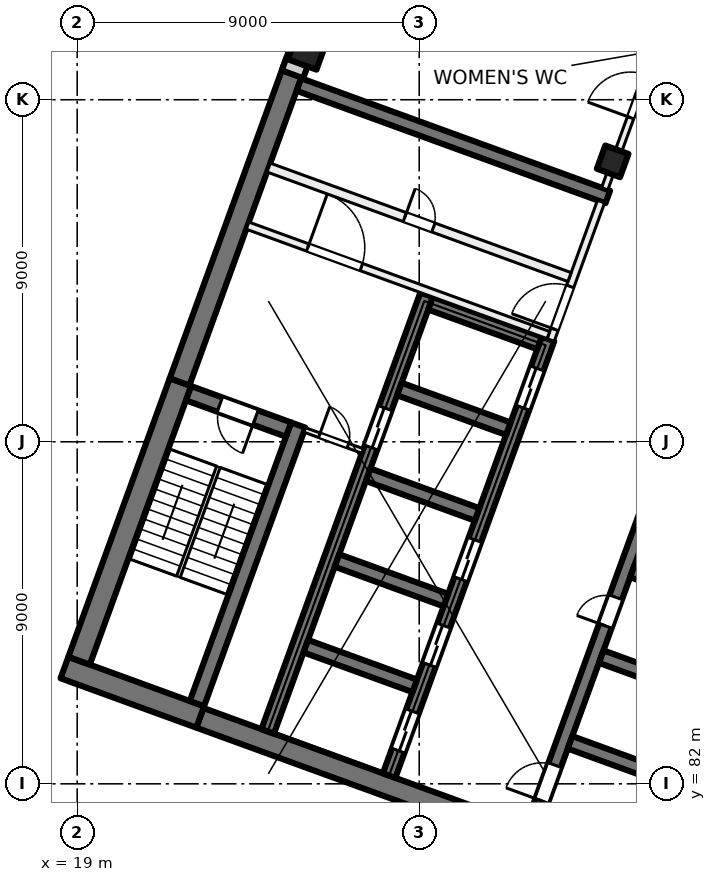
"""IFC4 building model, lengths in metres.
Left out: names, types, materials, properties, quantities, classifications, styles, units other than length and angle.
Written with IfcOpenShell. Run it as: python <this file> out.ifc"""

import sys

from ifc_helpers import new_model, si_unit, direction, frame, frame_2d, origin, origin_2d, place, context, subcontext, project, spatial, rectangle, extrude, element, fill, save


model = new_model("IFC4")
c1 = context("Model", 3, precision=1e-05, world=origin(), true_north=direction((0.0, 1.0)))
c2 = subcontext(c1, "Body", "Model", "MODEL_VIEW")
j1 = project(units=[si_unit("LENGTHUNIT", "METRE"), si_unit("PLANEANGLEUNIT", "RADIAN")], contexts=[c1])
p1 = place(None, origin())
s1 = spatial("IfcSite", under=j1, at=p1, CompositionType="ELEMENT")
p2 = place(p1, origin())
s2 = spatial("IfcBuilding", under=s1, at=p2, CompositionType="ELEMENT")
p3 = place(p2, frame((0.0, 0.0, 178.5)))
s3 = spatial("IfcBuildingStorey", under=s2, at=p3, CompositionType="ELEMENT", Elevation=178.5)
p4 = place(p3, frame((33.091, 98.379, 0.0), z_axis=(0.0, 0.0, 1.0), x_axis=(-0.342020143326, -0.939692620786, 0.0)))
e1 = element("IfcColumn", 1, at=p4, inside=s3, PredefinedType="COLUMN", context=c2, shape_type="SweptSolid", body=[
    extrude(rectangle(XDim=0.65, YDim=0.65, at=origin_2d()), origin(), (0.0, 0.0, 1.0), 4.0),
])
p5 = place(p3, frame((25.056, 101.303, 0.0), z_axis=(0.0, 0.0, 1.0), x_axis=(-0.342020143326, -0.939692620786, 0.0)))
e2 = element("IfcColumn", 2, at=p5, inside=s3, PredefinedType="COLUMN", context=c2, shape_type="SweptSolid", body=[
    extrude(rectangle(XDim=0.8, YDim=0.8, at=origin_2d()), origin(), (0.0, 0.0, 1.0), 4.0),
])
p6 = place(p3, frame((35.759, 78.811, 0.0), z_axis=(0.0, 0.0, 1.0), x_axis=(-0.939692894512, 0.342019391267, 0.0)))
e3 = element("IfcWall", 3, at=p6, inside=s3, PredefinedType="SHEAR", context=c2, shape_type="SweptSolid", body=[
    extrude(rectangle(XDim=14.4, YDim=0.55, at=frame_2d((7.2, 0.0))), origin(), (0.0, 0.0, 1.0), 4.0),
])
p7 = place(p3, frame((22.236, 83.76, 0.0), z_axis=(0.0, 0.0, 1.0), x_axis=(-0.939680822529, 0.342052557032, 0.0)))
e4 = element("IfcWall", 4, at=p7, inside=s3, PredefinedType="SHEAR", context=c2, shape_type="SweptSolid", body=[
    extrude(rectangle(XDim=3.8, YDim=0.6, at=frame_2d((1.9, 0.0))), origin(), (0.0, 0.0, 1.0), 4.0),
])
p8 = place(p3, frame((19.05, 85.239, 0.0), z_axis=(0.0, 0.0, 1.0), x_axis=(0.342016982193, 0.939693771338, 0.0)))
e5 = element("IfcWall", 5, at=p8, inside=s3, PredefinedType="SHEAR", context=c2, shape_type="SweptSolid", body=[
    extrude(rectangle(XDim=7.8, YDim=0.6, at=frame_2d((3.9, 0.0))), origin(), (0.0, 0.0, 1.0), 4.0),
])
p9 = place(p3, frame((21.694, 92.577, 0.0), z_axis=(0.0, 0.0, 1.0), x_axis=(0.342010253184, 0.939696220444, 0.0)))
e6 = element("IfcWall", 6, at=p9, inside=s3, PredefinedType="SHEAR", context=c2, shape_type="SweptSolid", body=[
    extrude(rectangle(XDim=8.95, YDim=0.55, at=frame_2d((4.475, 0.0))), origin(), (0.0, 0.0, 1.0), 4.0),
])
p10 = place(p3, frame((22.15, 84.11, 0.0), z_axis=(0.0, 0.0, 1.0), x_axis=(0.342016982193, 0.939693771338, 0.0)))
e7 = element("IfcWall", 7, at=p10, inside=s3, PredefinedType="SHEAR", context=c2, shape_type="SweptSolid", body=[
    extrude(rectangle(XDim=7.8, YDim=0.4, at=frame_2d((3.9, 0.0))), origin(), (0.0, 0.0, 1.0), 4.0),
])
p11 = place(p3, frame((24.562, 91.32, 0.0), z_axis=(0.0, 0.0, 1.0), x_axis=(-0.939717030584, 0.341953070509, 0.0)))
e8 = element("IfcWall", 8, at=p11, inside=s3, PredefinedType="SHEAR", context=c2, shape_type="SweptSolid", body=[
    extrude(rectangle(XDim=2.8, YDim=0.4, at=frame_2d((1.4, 0.0))), origin(), (0.0, 0.0, 1.0), 4.0),
])
p12 = place(p11, frame((0.925, 0.0, 0.0)))
e9 = element("IfcOpeningElement", 9, at=p12, cuts=e8, PredefinedType="OPENING", context=c2, shape_type="SweptSolid", body=[
    extrude(rectangle(XDim=1.0, YDim=2.1, at=frame_2d((0.5, 1.05))), frame((0.0, 0.21, 0.0), z_axis=(0.0, -1.0, 0.0), x_axis=(1.0, 0.0, 0.0)), (0.0, 0.0, 1.0), 0.42),
])
p13 = place(p3, frame((30.967, 80.848, 0.0), z_axis=(0.0, 0.0, 1.0), x_axis=(0.34201563943, 0.939694260058, 0.0)))
e10 = element("IfcWall", 10, at=p13, inside=s3, PredefinedType="SHEAR", context=c2, shape_type="SweptSolid", body=[
    extrude(rectangle(XDim=12.225, YDim=0.35, at=frame_2d((6.113, 0.0))), origin(), (0.0, 0.0, 1.0), 4.0),
])
p14 = place(p13, frame((0.75, 0.0, 0.0)))
e11 = element("IfcOpeningElement", 11, at=p14, cuts=e10, PredefinedType="OPENING", context=c2, shape_type="SweptSolid", body=[
    extrude(rectangle(XDim=1.0, YDim=2.1, at=frame_2d((0.5, 1.05))), frame((0.0, 0.185, 0.0), z_axis=(0.0, -1.0, 0.0), x_axis=(1.0, 0.0, 0.0)), (0.0, 0.0, 1.0), 0.37),
])
p15 = place(p13, frame((5.65, 0.0, 0.0)))
e12 = element("IfcOpeningElement", 12, at=p15, cuts=e10, PredefinedType="OPENING", context=c2, shape_type="SweptSolid", body=[
    extrude(rectangle(XDim=0.8, YDim=2.1, at=frame_2d((0.4, 1.05))), frame((0.0, 0.185, 0.0), z_axis=(0.0, -1.0, 0.0), x_axis=(1.0, 0.0, 0.0)), (0.0, 0.0, 1.0), 0.37),
])
p16 = place(p3, frame((34.835, 82.047, 0.0), z_axis=(0.0, 0.0, 1.0), x_axis=(-0.939683528043, 0.3420451244, 0.0)))
e13 = element("IfcWall", 13, at=p16, inside=s3, PredefinedType="SHEAR", context=c2, shape_type="SweptSolid", body=[
    extrude(rectangle(XDim=3.05, YDim=0.35, at=frame_2d((1.525, 0.0))), origin(), (0.0, 0.0, 1.0), 4.0),
])
p17 = place(p3, frame((35.656, 84.303, 0.0), z_axis=(0.0, 0.0, 1.0), x_axis=(-0.939709254651, 0.341974438698, 0.0)))
e14 = element("IfcWall", 14, at=p17, inside=s3, PredefinedType="SHEAR", context=c2, shape_type="SweptSolid", body=[
    extrude(rectangle(XDim=3.05, YDim=0.35, at=frame_2d((1.525, 0.0))), origin(), (0.0, 0.0, 1.0), 4.0),
])
p18 = place(p3, frame((36.477, 86.558, 0.0), z_axis=(0.0, 0.0, 1.0), x_axis=(-0.939683528043, 0.3420451244, 0.0)))
e15 = element("IfcWall", 15, at=p18, inside=s3, PredefinedType="SHEAR", context=c2, shape_type="SweptSolid", body=[
    extrude(rectangle(XDim=3.05, YDim=0.35, at=frame_2d((1.525, 0.0))), origin(), (0.0, 0.0, 1.0), 4.0),
])
p19 = place(p3, frame((27.208, 82.216, 0.0), z_axis=(0.0, 0.0, 1.0), x_axis=(0.34201563943, 0.939694260058, 0.0)))
e16 = element("IfcWall", 16, at=p19, inside=s3, PredefinedType="SHEAR", context=c2, shape_type="SweptSolid", body=[
    extrude(rectangle(XDim=12.225, YDim=0.35, at=frame_2d((6.113, 0.0))), origin(), (0.0, 0.0, 1.0), 4.0),
])
p20 = place(p19, frame((0.7, 0.0, 0.0)))
e17 = element("IfcOpeningElement", 17, at=p20, cuts=e16, PredefinedType="OPENING", context=c2, shape_type="SweptSolid", body=[
    extrude(rectangle(XDim=1.1, YDim=2.1, at=frame_2d((0.55, 1.05))), frame((0.0, 0.185, 0.0), z_axis=(0.0, -1.0, 0.0), x_axis=(1.0, 0.0, 0.0)), (0.0, 0.0, 1.0), 0.37),
])
p21 = place(p19, frame((3.1, 0.0, 0.0)))
e18 = element("IfcOpeningElement", 18, at=p21, cuts=e16, PredefinedType="OPENING", context=c2, shape_type="SweptSolid", body=[
    extrude(rectangle(XDim=1.1, YDim=2.1, at=frame_2d((0.55, 1.05))), frame((0.0, 0.185, 0.0), z_axis=(0.0, -1.0, 0.0), x_axis=(1.0, 0.0, 0.0)), (0.0, 0.0, 1.0), 0.37),
])
p22 = place(p19, frame((5.5, 0.0, 0.0)))
e19 = element("IfcOpeningElement", 19, at=p22, cuts=e16, PredefinedType="OPENING", context=c2, shape_type="SweptSolid", body=[
    extrude(rectangle(XDim=1.1, YDim=2.1, at=frame_2d((0.55, 1.05))), frame((0.0, 0.185, 0.0), z_axis=(0.0, -1.0, 0.0), x_axis=(1.0, 0.0, 0.0)), (0.0, 0.0, 1.0), 0.37),
])
p23 = place(p19, frame((10.3, 0.0, 0.0)))
e20 = element("IfcOpeningElement", 20, at=p23, cuts=e16, PredefinedType="OPENING", context=c2, shape_type="SweptSolid", body=[
    extrude(rectangle(XDim=1.1, YDim=2.1, at=frame_2d((0.55, 1.05))), frame((0.0, 0.185, 0.0), z_axis=(0.0, -1.0, 0.0), x_axis=(1.0, 0.0, 0.0)), (0.0, 0.0, 1.0), 0.37),
])
p24 = place(p3, frame((24.013, 83.379, 0.0), z_axis=(0.0, 0.0, 1.0), x_axis=(0.34201563943, 0.939694260058, 0.0)))
e21 = element("IfcWall", 21, at=p24, inside=s3, PredefinedType="SHEAR", context=c2, shape_type="SweptSolid", body=[
    extrude(rectangle(XDim=12.225, YDim=0.35, at=frame_2d((6.113, 0.0))), origin(), (0.0, 0.0, 1.0), 4.0),
])
p25 = place(p24, frame((7.95, 0.0, 0.0)))
e22 = element("IfcOpeningElement", 22, at=p25, cuts=e21, PredefinedType="OPENING", context=c2, shape_type="SweptSolid", body=[
    extrude(rectangle(XDim=1.1, YDim=2.1, at=frame_2d((0.55, 1.05))), frame((0.0, 0.185, 0.0), z_axis=(0.0, -1.0, 0.0), x_axis=(1.0, 0.0, 0.0)), (0.0, 0.0, 1.0), 0.37),
])
for number, where, z_axis, x_axis in (
    (23, (27.881, 84.578, 0.0), (0.0, 0.0, 1.0), (-0.94, 0.342, 0.0)),
    (24, (28.702, 86.833, 0.0), (0.0, 0.0, 1.0), (-0.94, 0.342, 0.0)),
    (25, (29.523, 89.089, 0.0), (0.0, 0.0, 1.0), (-0.94, 0.342, 0.0)),
):
    element("IfcWall", number, at=place(p3, frame(where, z_axis=z_axis, x_axis=x_axis)), inside=s3, PredefinedType="SHEAR", context=c2, shape_type="SweptSolid", body=[
        extrude(rectangle(XDim=3.05, YDim=0.35, at=frame_2d((1.525, 0.0))), origin(), (0.0, 0.0, 1.0), 4.0),
    ])
p26 = place(p3, frame((30.344, 91.344, 0.0), z_axis=(0.0, 0.0, 1.0), x_axis=(-0.939709254651, 0.341974438698, 0.0)))
e26 = element("IfcWall", 26, at=p26, inside=s3, PredefinedType="SHEAR", context=c2, shape_type="SweptSolid", body=[
    extrude(rectangle(XDim=3.05, YDim=0.35, at=frame_2d((1.525, 0.0))), origin(), (0.0, 0.0, 1.0), 4.0),
])
p27 = place(p3, frame((31.165, 93.599, 0.0), z_axis=(0.0, 0.0, 1.0), x_axis=(-0.939683528043, 0.3420451244, 0.0)))
e27 = element("IfcWall", 27, at=p27, inside=s3, PredefinedType="SHEAR", context=c2, shape_type="SweptSolid", body=[
    extrude(rectangle(XDim=3.05, YDim=0.35, at=frame_2d((1.525, 0.0))), origin(), (0.0, 0.0, 1.0), 4.0),
])
p28 = place(p3, frame((32.962, 97.441, 0.0), z_axis=(0.0, 0.0, 1.0), x_axis=(-0.939689545667, 0.342028592028, 0.0)))
e28 = element("IfcWall", 28, at=p28, inside=s3, PredefinedType="SHEAR", context=c2, shape_type="SweptSolid", body=[
    extrude(rectangle(XDim=8.65, YDim=0.35, at=frame_2d((4.325, 0.0))), origin(), (0.0, 0.0, 1.0), 4.0),
])
p29 = place(p3, frame((24.666, 100.669, 0.0), z_axis=(0.0, 0.0, 1.0), x_axis=(0.34201964167, 0.939692803373, 0.0)))
e29 = element("IfcWall", 29, at=p29, inside=s3, PredefinedType="SOLIDWALL", context=c2, shape_type="SweptSolid", body=[
    extrude(rectangle(XDim=32.884, YDim=0.6, at=frame_2d((16.442, 0.0))), origin(), (0.0, 0.0, 1.0), 3.625),
])
p30 = place(p29, frame((1.48, 0.0, 0.9)))
e30 = element("IfcOpeningElement", 30, at=p30, cuts=e29, PredefinedType="OPENING", context=c2, shape_type="SweptSolid", body=[
    extrude(rectangle(XDim=3.0, YDim=2.4, at=frame_2d((1.5, 1.2))), frame((0.0, 0.31, 0.0), z_axis=(0.0, -1.0, 0.0), x_axis=(1.0, 0.0, 0.0)), (0.0, 0.0, 1.0), 0.62),
])
p31 = place(p29, frame((5.98, 0.0, 0.9)))
e31 = element("IfcOpeningElement", 31, at=p31, cuts=e29, PredefinedType="OPENING", context=c2, shape_type="SweptSolid", body=[
    extrude(rectangle(XDim=3.0, YDim=2.4, at=frame_2d((1.5, 1.2))), frame((0.0, 0.31, 0.0), z_axis=(0.0, -1.0, 0.0), x_axis=(1.0, 0.0, 0.0)), (0.0, 0.0, 1.0), 0.62),
])
p32 = place(p29, frame((11.08, 0.0, 0.0)))
e32 = element("IfcOpeningElement", 32, at=p32, cuts=e29, PredefinedType="OPENING", context=c2, shape_type="SweptSolid", body=[
    extrude(rectangle(XDim=1.8, YDim=2.4, at=frame_2d((0.9, 1.2))), frame((0.0, 0.31, 0.0), z_axis=(0.0, -1.0, 0.0), x_axis=(1.0, 0.0, 0.0)), (0.0, 0.0, 1.0), 0.62),
])
p33 = place(p29, frame((14.98, 0.0, 0.9)))
e33 = element("IfcOpeningElement", 33, at=p33, cuts=e29, PredefinedType="OPENING", context=c2, shape_type="SweptSolid", body=[
    extrude(rectangle(XDim=3.0, YDim=2.4, at=frame_2d((1.5, 1.2))), frame((0.0, 0.31, 0.0), z_axis=(0.0, -1.0, 0.0), x_axis=(1.0, 0.0, 0.0)), (0.0, 0.0, 1.0), 0.62),
])
p34 = place(p29, frame((19.48, 0.0, 0.9)))
e34 = element("IfcOpeningElement", 34, at=p34, cuts=e29, PredefinedType="OPENING", context=c2, shape_type="SweptSolid", body=[
    extrude(rectangle(XDim=3.0, YDim=2.4, at=frame_2d((1.5, 1.2))), frame((0.0, 0.31, 0.0), z_axis=(0.0, -1.0, 0.0), x_axis=(1.0, 0.0, 0.0)), (0.0, 0.0, 1.0), 0.62),
])
p35 = place(p29, frame((24.58, 0.0, 0.0)))
e35 = element("IfcOpeningElement", 35, at=p35, cuts=e29, PredefinedType="OPENING", context=c2, shape_type="SweptSolid", body=[
    extrude(rectangle(XDim=1.8, YDim=2.4, at=frame_2d((0.9, 1.2))), frame((0.0, 0.31, 0.0), z_axis=(0.0, -1.0, 0.0), x_axis=(1.0, 0.0, 0.0)), (0.0, 0.0, 1.0), 0.62),
])
p36 = place(p29, frame((28.48, 0.0, 0.9)))
e36 = element("IfcOpeningElement", 36, at=p36, cuts=e29, PredefinedType="OPENING", context=c2, shape_type="SweptSolid", body=[
    extrude(rectangle(XDim=3.0, YDim=2.4, at=frame_2d((1.5, 1.2))), frame((0.0, 0.31, 0.0), z_axis=(0.0, -1.0, 0.0), x_axis=(1.0, 0.0, 0.0)), (0.0, 0.0, 1.0), 0.62),
])
p37 = place(p3, frame((31.459, 93.678, 0.0), z_axis=(0.0, 0.0, 1.0), x_axis=(0.341985870128, 0.939705094502, 0.0)))
e37 = element("IfcWall", 37, at=p37, inside=s3, PredefinedType="PARTITIONING", context=c2, shape_type="SweptSolid", body=[
    extrude(rectangle(XDim=3.875, YDim=0.2, at=frame_2d((1.938, 0.0))), origin(), (0.0, 0.0, 1.0), 3.625),
])
p38 = place(p37, frame((0.3, 0.0, 0.0)))
e38 = element("IfcOpeningElement", 38, at=p38, cuts=e37, PredefinedType="OPENING", context=c2, shape_type="SweptSolid", body=[
    extrude(rectangle(XDim=1.2, YDim=2.1, at=frame_2d((0.6, 1.05))), frame((0.0, 0.11, 0.0), z_axis=(0.0, -1.0, 0.0), x_axis=(1.0, 0.0, 0.0)), (0.0, 0.0, 1.0), 0.22),
])
p39 = place(p3, frame((23.483, 96.688, 0.0), z_axis=(0.0, 0.0, 1.0), x_axis=(0.939691007314, -0.342024576271, 0.0)))
e39 = element("IfcWall", 39, at=p39, inside=s3, PredefinedType="PARTITIONING", context=c2, shape_type="SweptSolid", body=[
    extrude(rectangle(XDim=8.425, YDim=0.2, at=frame_2d((4.212, 0.0))), origin(), (0.0, 0.0, 1.0), 3.625),
])
p40 = place(p39, frame((1.688, 0.0, 0.0)))
e40 = element("IfcOpeningElement", 40, at=p40, cuts=e39, PredefinedType="OPENING", context=c2, shape_type="SweptSolid", body=[
    extrude(rectangle(XDim=1.5, YDim=2.1, at=frame_2d((0.75, 1.05))), frame((0.0, 0.11, 0.0), z_axis=(0.0, -1.0, 0.0), x_axis=(1.0, 0.0, 0.0)), (0.0, 0.0, 1.0), 0.22),
])
p41 = place(p3, frame((24.039, 98.215, 0.0), z_axis=(0.0, 0.0, 1.0), x_axis=(0.939687617333, -0.342033889887, 0.0)))
e41 = element("IfcWall", 41, at=p41, inside=s3, PredefinedType="PARTITIONING", context=c2, shape_type="SweptSolid", body=[
    extrude(rectangle(XDim=8.425, YDim=0.25, at=frame_2d((4.212, 0.0))), origin(), (0.0, 0.0, 1.0), 3.625),
])
p42 = place(p41, frame((3.812, 0.0, 0.0)))
e42 = element("IfcOpeningElement", 42, at=p42, cuts=e41, PredefinedType="OPENING", context=c2, shape_type="SweptSolid", body=[
    extrude(rectangle(XDim=0.8, YDim=2.1, at=frame_2d((0.4, 1.05))), frame((0.0, 0.135, 0.0), z_axis=(0.0, -1.0, 0.0), x_axis=(1.0, 0.0, 0.0)), (0.0, 0.0, 1.0), 0.27),
])
p43 = place(p3, frame((24.985, 91.312, 0.0), z_axis=(0.0, 0.0, 1.0), x_axis=(0.939705651352, -0.341984340019, 0.0)))
e43 = element("IfcWall", 43, at=p43, inside=s3, PredefinedType="PARTITIONING", context=c2, shape_type="SweptSolid", body=[
    extrude(rectangle(XDim=1.625, YDim=0.125, at=frame_2d((0.812, 0.0))), origin(), (0.0, 0.0, 1.0), 3.625),
])
p44 = place(p43, frame((0.413, 0.0, 0.0)))
e44 = element("IfcOpeningElement", 44, at=p44, cuts=e43, PredefinedType="OPENING", context=c2, shape_type="SweptSolid", body=[
    extrude(rectangle(XDim=0.8, YDim=2.1, at=frame_2d((0.4, 1.05))), frame((0.0, 0.073, 0.0), z_axis=(0.0, -1.0, 0.0), x_axis=(1.0, 0.0, 0.0)), (0.0, 0.0, 1.0), 0.145),
])
p45 = place(p3, frame((26.736, 105.48, 0.0), z_axis=(0.0, 0.0, 1.0), x_axis=(0.939721611154, -0.341940482438, 0.0)))
e45 = element("IfcWall", 45, at=p45, inside=s3, PredefinedType="PARTITIONING", context=c2, shape_type="SweptSolid", body=[
    extrude(rectangle(XDim=12.312, YDim=0.175, at=frame_2d((6.156, 0.0))), origin(), (0.0, 0.0, 1.0), 3.625),
])
p46 = place(p3, frame((32.881, 97.657, 0.0), z_axis=(0.0, 0.0, 1.0), x_axis=(0.342058204353, 0.939678766832, 0.0)))
e46 = element("IfcWall", 46, at=p46, inside=s3, PredefinedType="PARTITIONING", context=c2, shape_type="SweptSolid", body=[
    extrude(rectangle(XDim=5.163, YDim=0.175, at=frame_2d((2.581, 0.0))), origin(), (0.0, 0.0, 1.0), 3.625),
])
p47 = place(p46, frame((1.991, 0.0, 0.0)))
e47 = element("IfcOpeningElement", 47, at=p47, cuts=e46, PredefinedType="OPENING", context=c2, shape_type="SweptSolid", body=[
    extrude(rectangle(XDim=1.2, YDim=2.1, at=frame_2d((0.6, 1.05))), frame((0.0, 0.097, 0.0), z_axis=(0.0, -1.0, 0.0), x_axis=(1.0, 0.0, 0.0)), (0.0, 0.0, 1.0), 0.195),
])
p48 = place(p20, origin())
e48 = element("IfcDoor", 48, at=p48, inside=s3, OperationType="DOUBLE_DOOR_SLIDING", PredefinedType="DOOR", context=c2, shape_type="SweptSolid", body=[
    extrude(rectangle(XDim=1.1, YDim=2.1, at=frame_2d((0.55, 1.05))), frame((0.0, 0.025, 0.0), z_axis=(0.0, -1.0, 0.0), x_axis=(1.0, 0.0, 0.0)), (0.0, 0.0, 1.0), 0.05),
])
fill(e17, e48)
p49 = place(p21, origin())
e49 = element("IfcDoor", 49, at=p49, inside=s3, OperationType="DOUBLE_DOOR_SLIDING", PredefinedType="DOOR", context=c2, shape_type="SweptSolid", body=[
    extrude(rectangle(XDim=1.1, YDim=2.1, at=frame_2d((0.55, 1.05))), frame((0.0, 0.025, 0.0), z_axis=(0.0, -1.0, 0.0), x_axis=(1.0, 0.0, 0.0)), (0.0, 0.0, 1.0), 0.05),
])
fill(e18, e49)
p50 = place(p22, origin())
e50 = element("IfcDoor", 50, at=p50, inside=s3, OperationType="DOUBLE_DOOR_SLIDING", PredefinedType="DOOR", context=c2, shape_type="SweptSolid", body=[
    extrude(rectangle(XDim=1.1, YDim=2.1, at=frame_2d((0.55, 1.05))), frame((0.0, 0.025, 0.0), z_axis=(0.0, -1.0, 0.0), x_axis=(1.0, 0.0, 0.0)), (0.0, 0.0, 1.0), 0.05),
])
fill(e19, e50)
p51 = place(p23, origin())
e51 = element("IfcDoor", 51, at=p51, inside=s3, OperationType="DOUBLE_DOOR_SLIDING", PredefinedType="DOOR", context=c2, shape_type="SweptSolid", body=[
    extrude(rectangle(XDim=1.1, YDim=2.1, at=frame_2d((0.55, 1.05))), frame((0.0, 0.025, 0.0), z_axis=(0.0, -1.0, 0.0), x_axis=(1.0, 0.0, 0.0)), (0.0, 0.0, 1.0), 0.05),
])
fill(e20, e51)
p52 = place(p14, origin())
e52 = element("IfcDoor", 52, at=p52, inside=s3, OperationType="SINGLE_SWING_LEFT", PredefinedType="DOOR", context=c2, shape_type="SweptSolid", body=[
    extrude(rectangle(XDim=1.0, YDim=2.1, at=frame_2d((0.5, 1.05))), frame((0.0, 0.025, 0.0), z_axis=(0.0, -1.0, 0.0), x_axis=(1.0, 0.0, 0.0)), (0.0, 0.0, 1.0), 0.05),
])
fill(e11, e52)
p53 = place(p15, origin())
e53 = element("IfcDoor", 53, at=p53, inside=s3, OperationType="SINGLE_SWING_RIGHT", PredefinedType="DOOR", context=c2, shape_type="SweptSolid", body=[
    extrude(rectangle(XDim=0.8, YDim=2.1, at=frame_2d((0.4, 1.05))), frame((0.0, 0.025, 0.0), z_axis=(0.0, -1.0, 0.0), x_axis=(1.0, 0.0, 0.0)), (0.0, 0.0, 1.0), 0.05),
])
fill(e12, e53)
p54 = place(p38, origin())
e54 = element("IfcDoor", 54, at=p54, inside=s3, OperationType="DOUBLE_DOOR_SINGLE_SWING", PredefinedType="DOOR", context=c2, shape_type="SweptSolid", body=[
    extrude(rectangle(XDim=1.2, YDim=2.1, at=frame_2d((0.6, 1.05))), frame((0.0, 0.025, 0.0), z_axis=(0.0, -1.0, 0.0), x_axis=(1.0, 0.0, 0.0)), (0.0, 0.0, 1.0), 0.05),
])
fill(e38, e54)
p55 = place(p40, origin())
e55 = element("IfcDoor", 55, at=p55, inside=s3, OperationType="DOUBLE_DOOR_SINGLE_SWING", PredefinedType="DOOR", context=c2, shape_type="SweptSolid", body=[
    extrude(rectangle(XDim=1.5, YDim=2.1, at=frame_2d((0.75, 1.05))), frame((0.0, 0.025, 0.0), z_axis=(0.0, -1.0, 0.0), x_axis=(1.0, 0.0, 0.0)), (0.0, 0.0, 1.0), 0.05),
])
fill(e40, e55)
p56 = place(p12, origin())
e56 = element("IfcDoor", 56, at=p56, inside=s3, OperationType="SINGLE_SWING_LEFT", PredefinedType="DOOR", context=c2, shape_type="SweptSolid", body=[
    extrude(rectangle(XDim=1.0, YDim=2.1, at=frame_2d((0.5, 1.05))), frame((0.0, 0.025, 0.0), z_axis=(0.0, -1.0, 0.0), x_axis=(1.0, 0.0, 0.0)), (0.0, 0.0, 1.0), 0.05),
])
fill(e9, e56)
p57 = place(p44, origin())
e57 = element("IfcDoor", 57, at=p57, inside=s3, OperationType="SINGLE_SWING_RIGHT", PredefinedType="DOOR", context=c2, shape_type="SweptSolid", body=[
    extrude(rectangle(XDim=0.8, YDim=2.1, at=frame_2d((0.4, 1.05))), frame((0.0, 0.025, 0.0), z_axis=(0.0, -1.0, 0.0), x_axis=(1.0, 0.0, 0.0)), (0.0, 0.0, 1.0), 0.05),
])
fill(e44, e57)
p58 = place(p42, origin())
e58 = element("IfcDoor", 58, at=p58, inside=s3, OperationType="SINGLE_SWING_LEFT", PredefinedType="DOOR", context=c2, shape_type="SweptSolid", body=[
    extrude(rectangle(XDim=0.8, YDim=2.1, at=frame_2d((0.4, 1.05))), frame((0.0, 0.025, 0.0), z_axis=(0.0, -1.0, 0.0), x_axis=(1.0, 0.0, 0.0)), (0.0, 0.0, 1.0), 0.05),
])
fill(e42, e58)
p59 = place(p25, origin())
e59 = element("IfcDoor", 59, at=p59, inside=s3, OperationType="DOUBLE_DOOR_SLIDING", PredefinedType="DOOR", context=c2, shape_type="SweptSolid", body=[
    extrude(rectangle(XDim=1.1, YDim=2.1, at=frame_2d((0.55, 1.05))), frame((0.0, 0.025, 0.0), z_axis=(0.0, -1.0, 0.0), x_axis=(1.0, 0.0, 0.0)), (0.0, 0.0, 1.0), 0.05),
])
fill(e22, e59)
p60 = place(p47, origin())
e60 = element("IfcDoor", 60, at=p60, inside=s3, OperationType="DOUBLE_DOOR_SINGLE_SWING", PredefinedType="DOOR", context=c2, shape_type="SweptSolid", body=[
    extrude(rectangle(XDim=1.2, YDim=2.1, at=frame_2d((0.6, 1.05))), frame((0.0, 0.025, 0.0), z_axis=(0.0, -1.0, 0.0), x_axis=(1.0, 0.0, 0.0)), (0.0, 0.0, 1.0), 0.05),
])
fill(e47, e60)
save(model, sys.argv[1])
